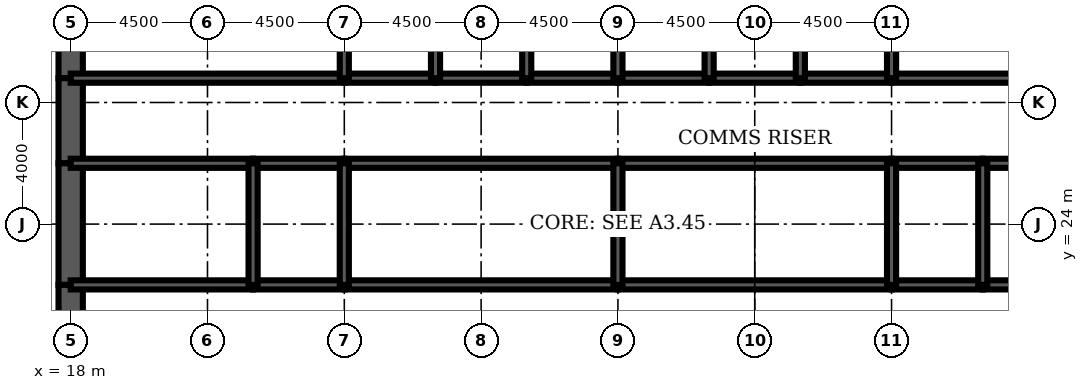
"""IFC4 building model, lengths in metres.
Left out: names, types, materials, properties, quantities, classifications, styles, units other than length and angle.
Written with IfcOpenShell. Run it as: python <this file> out.ifc"""

import sys

from ifc_helpers import new_model, si_unit, direction, frame, frame_2d, origin, place, context, subcontext, project, spatial, rectangle, extrude, element, fill, save


model = new_model("IFC4")
c1 = context("Model", 3, precision=1e-05, world=origin(), true_north=direction((0.0, 1.0)))
c2 = subcontext(c1, "Body", "Model", "MODEL_VIEW")
j1 = project(units=[si_unit("LENGTHUNIT", "METRE"), si_unit("PLANEANGLEUNIT", "RADIAN")], contexts=[c1])
p1 = place(None, origin())
s1 = spatial("IfcSite", under=j1, at=p1, CompositionType="ELEMENT")
p2 = place(p1, origin())
s2 = spatial("IfcBuilding", under=s1, at=p2, CompositionType="ELEMENT")
p3 = place(p2, frame((0.0, 0.0, 194.2)))
s3 = spatial("IfcBuildingStorey", under=s2, at=p3, CompositionType="ELEMENT", Elevation=194.2)
p4 = place(p3, frame((18.0, 32.0, 0.0), z_axis=(0.0, 0.0, 1.0), x_axis=(0.0, -1.0, 0.0)))
e1 = element("IfcWall", 1, at=p4, inside=s3, PredefinedType="SHEAR", context=c2, shape_type="SweptSolid", body=[
    extrude(rectangle(XDim=3.2, YDim=0.8, at=frame_2d((1.6, 0.0))), origin(), (0.0, 0.0, 1.0), 4.2),
])
p5 = place(p3, frame((18.0, 28.8, 0.0), z_axis=(0.0, 0.0, 1.0), x_axis=(0.0, -1.0, 0.0)))
e2 = element("IfcWall", 2, at=p5, inside=s3, PredefinedType="SHEAR", context=c2, shape_type="SweptSolid", body=[
    extrude(rectangle(XDim=2.8, YDim=0.8, at=frame_2d((1.4, 0.0))), origin(), (0.0, 0.0, 1.0), 4.2),
])
p6 = place(p5, frame((0.4, 0.0, 0.0)))
e3 = element("IfcOpeningElement", 3, at=p6, cuts=e2, PredefinedType="OPENING", context=c2, shape_type="SweptSolid", body=[
    extrude(rectangle(XDim=1.8, YDim=2.1, at=frame_2d((0.9, 1.05))), frame((0.0, 0.41, 0.0), z_axis=(0.0, -1.0, 0.0), x_axis=(1.0, 0.0, 0.0)), (0.0, 0.0, 1.0), 0.82),
])
p7 = place(p3, frame((18.0, 26.0, 0.0), z_axis=(0.0, 0.0, 1.0), x_axis=(0.0, -1.0, 0.0)))
e4 = element("IfcWall", 4, at=p7, inside=s3, PredefinedType="SHEAR", context=c2, shape_type="SweptSolid", body=[
    extrude(rectangle(XDim=4.0, YDim=0.8, at=frame_2d((2.0, 0.0))), origin(), (0.0, 0.0, 1.0), 4.2),
])
p8 = place(p3, frame((18.0, 22.0, 0.0), z_axis=(0.0, 0.0, 1.0), x_axis=(0.0, -1.0, 0.0)))
e5 = element("IfcWall", 5, at=p8, inside=s3, PredefinedType="SHEAR", context=c2, shape_type="SweptSolid", body=[
    extrude(rectangle(XDim=2.8, YDim=0.8, at=frame_2d((1.4, 0.0))), origin(), (0.0, 0.0, 1.0), 4.2),
])
p9 = place(p8, frame((0.6, 0.0, 0.0)))
e6 = element("IfcOpeningElement", 6, at=p9, cuts=e5, PredefinedType="OPENING", context=c2, shape_type="SweptSolid", body=[
    extrude(rectangle(XDim=1.8, YDim=2.1, at=frame_2d((0.9, 1.05))), frame((0.0, 0.41, 0.0), z_axis=(0.0, -1.0, 0.0), x_axis=(1.0, 0.0, 0.0)), (0.0, 0.0, 1.0), 0.82),
])
p10 = place(p3, frame((18.0, 28.8, 0.0), z_axis=(0.0, 0.0, 1.0), x_axis=(1.0, 0.0, 0.0)))
e7 = element("IfcWall", 7, at=p10, inside=s3, PredefinedType="SOLIDWALL", context=c2, shape_type="SweptSolid", body=[
    extrude(rectangle(XDim=9.0, YDim=0.3, at=frame_2d((4.5, 0.0))), origin(), (0.0, 0.0, 1.0), 4.2),
])
p11 = place(p10, frame((0.65, 0.0, 0.0)))
e8 = element("IfcOpeningElement", 8, at=p11, cuts=e7, PredefinedType="OPENING", context=c2, shape_type="SweptSolid", body=[
    extrude(rectangle(XDim=1.0, YDim=2.1, at=frame_2d((0.5, 1.05))), frame((0.0, 0.16, 0.0), z_axis=(0.0, -1.0, 0.0), x_axis=(1.0, 0.0, 0.0)), (0.0, 0.0, 1.0), 0.32),
])
p12 = place(p3, frame((27.0, 28.8, 0.0), z_axis=(0.0, 0.0, 1.0), x_axis=(1.0, 0.0, 0.0)))
e9 = element("IfcWall", 9, at=p12, inside=s3, PredefinedType="SOLIDWALL", context=c2, shape_type="SweptSolid", body=[
    extrude(rectangle(XDim=3.0, YDim=0.3, at=frame_2d((1.5, 0.0))), origin(), (0.0, 0.0, 1.0), 4.2),
])
p13 = place(p12, frame((0.95, 0.0, 0.0)))
e10 = element("IfcOpeningElement", 10, at=p13, cuts=e9, PredefinedType="OPENING", context=c2, shape_type="SweptSolid", body=[
    extrude(rectangle(XDim=1.1, YDim=2.2, at=frame_2d((0.55, 1.1))), frame((0.0, 0.16, 0.0), z_axis=(0.0, -1.0, 0.0), x_axis=(1.0, 0.0, 0.0)), (0.0, 0.0, 1.0), 0.32),
])
p14 = place(p3, frame((30.0, 28.8, 0.0), z_axis=(0.0, 0.0, 1.0), x_axis=(1.0, 0.0, 0.0)))
e11 = element("IfcWall", 11, at=p14, inside=s3, PredefinedType="SOLIDWALL", context=c2, shape_type="SweptSolid", body=[
    extrude(rectangle(XDim=3.0, YDim=0.3, at=frame_2d((1.5, 0.0))), origin(), (0.0, 0.0, 1.0), 4.2),
])
p15 = place(p14, frame((0.95, 0.0, 0.0)))
e12 = element("IfcOpeningElement", 12, at=p15, cuts=e11, PredefinedType="OPENING", context=c2, shape_type="SweptSolid", body=[
    extrude(rectangle(XDim=1.1, YDim=2.2, at=frame_2d((0.55, 1.1))), frame((0.0, 0.16, 0.0), z_axis=(0.0, -1.0, 0.0), x_axis=(1.0, 0.0, 0.0)), (0.0, 0.0, 1.0), 0.32),
])
p16 = place(p3, frame((33.0, 28.8, 0.0), z_axis=(0.0, 0.0, 1.0), x_axis=(1.0, 0.0, 0.0)))
e13 = element("IfcWall", 13, at=p16, inside=s3, PredefinedType="SOLIDWALL", context=c2, shape_type="SweptSolid", body=[
    extrude(rectangle(XDim=3.0, YDim=0.3, at=frame_2d((1.5, 0.0))), origin(), (0.0, 0.0, 1.0), 4.2),
])
p17 = place(p16, frame((0.95, 0.0, 0.0)))
e14 = element("IfcOpeningElement", 14, at=p17, cuts=e13, PredefinedType="OPENING", context=c2, shape_type="SweptSolid", body=[
    extrude(rectangle(XDim=1.1, YDim=2.2, at=frame_2d((0.55, 1.1))), frame((0.0, 0.16, 0.0), z_axis=(0.0, -1.0, 0.0), x_axis=(1.0, 0.0, 0.0)), (0.0, 0.0, 1.0), 0.32),
])
for number, where, z_axis, x_axis in (
    (15, (36.0, 28.8, 0.0), (0.0, 0.0, 1.0), (1.0, 0.0, 0.0)),
    (16, (39.0, 28.8, 0.0), (0.0, 0.0, 1.0), (1.0, 0.0, 0.0)),
):
    element("IfcWall", number, at=place(p3, frame(where, z_axis=z_axis, x_axis=x_axis)), inside=s3, PredefinedType="SOLIDWALL", context=c2, shape_type="SweptSolid", body=[
        extrude(rectangle(XDim=3.0, YDim=0.3, at=frame_2d((1.5, 0.0))), origin(), (0.0, 0.0, 1.0), 4.2),
    ])
p18 = place(p3, frame((42.0, 28.8, 0.0), z_axis=(0.0, 0.0, 1.0), x_axis=(1.0, 0.0, 0.0)))
e17 = element("IfcWall", 17, at=p18, inside=s3, PredefinedType="SOLIDWALL", context=c2, shape_type="SweptSolid", body=[
    extrude(rectangle(XDim=3.0, YDim=0.3, at=frame_2d((1.5, 0.0))), origin(), (0.0, 0.0, 1.0), 4.2),
])
p19 = place(p18, frame((0.95, 0.0, 0.0)))
e18 = element("IfcOpeningElement", 18, at=p19, cuts=e17, PredefinedType="OPENING", context=c2, shape_type="SweptSolid", body=[
    extrude(rectangle(XDim=1.1, YDim=2.2, at=frame_2d((0.55, 1.1))), frame((0.0, 0.16, 0.0), z_axis=(0.0, -1.0, 0.0), x_axis=(1.0, 0.0, 0.0)), (0.0, 0.0, 1.0), 0.32),
])
p20 = place(p3, frame((45.0, 28.8, 0.0), z_axis=(0.0, 0.0, 1.0), x_axis=(1.0, 0.0, 0.0)))
e19 = element("IfcWall", 19, at=p20, inside=s3, PredefinedType="SOLIDWALL", context=c2, shape_type="SweptSolid", body=[
    extrude(rectangle(XDim=9.0, YDim=0.3, at=frame_2d((4.5, 0.0))), origin(), (0.0, 0.0, 1.0), 4.2),
])
p21 = place(p20, frame((7.35, 0.0, 0.0)))
e20 = element("IfcOpeningElement", 20, at=p21, cuts=e19, PredefinedType="OPENING", context=c2, shape_type="SweptSolid", body=[
    extrude(rectangle(XDim=1.0, YDim=2.1, at=frame_2d((0.5, 1.05))), frame((0.0, 0.16, 0.0), z_axis=(0.0, -1.0, 0.0), x_axis=(1.0, 0.0, 0.0)), (0.0, 0.0, 1.0), 0.32),
])
p22 = place(p3, frame((18.0, 22.0, 0.0), z_axis=(0.0, 0.0, 1.0), x_axis=(1.0, 0.0, 0.0)))
e21 = element("IfcWall", 21, at=p22, inside=s3, PredefinedType="SOLIDWALL", context=c2, shape_type="SweptSolid", body=[
    extrude(rectangle(XDim=6.0, YDim=0.3, at=frame_2d((3.0, 0.0))), origin(), (0.0, 0.0, 1.0), 4.2),
])
p23 = place(p22, frame((4.4, 0.0, 0.0)))
e22 = element("IfcOpeningElement", 22, at=p23, cuts=e21, PredefinedType="OPENING", context=c2, shape_type="SweptSolid", body=[
    extrude(rectangle(XDim=1.0, YDim=2.1, at=frame_2d((0.5, 1.05))), frame((0.0, 0.16, 0.0), z_axis=(0.0, -1.0, 0.0), x_axis=(1.0, 0.0, 0.0)), (0.0, 0.0, 1.0), 0.32),
])
p24 = place(p22, frame((0.95, 0.0, 0.0)))
e23 = element("IfcOpeningElement", 23, at=p24, cuts=e21, PredefinedType="OPENING", context=c2, shape_type="SweptSolid", body=[
    extrude(rectangle(XDim=1.0, YDim=2.1, at=frame_2d((0.5, 1.05))), frame((0.0, 0.16, 0.0), z_axis=(0.0, -1.0, 0.0), x_axis=(1.0, 0.0, 0.0)), (0.0, 0.0, 1.0), 0.32),
])
p25 = place(p3, frame((24.0, 22.0, 0.0), z_axis=(0.0, 0.0, 1.0), x_axis=(1.0, 0.0, 0.0)))
e24 = element("IfcWall", 24, at=p25, inside=s3, PredefinedType="SOLIDWALL", context=c2, shape_type="SweptSolid", body=[
    extrude(rectangle(XDim=3.0, YDim=0.3, at=frame_2d((1.5, 0.0))), origin(), (0.0, 0.0, 1.0), 4.2),
])
p26 = place(p25, frame((1.0, 0.0, 0.0)))
e25 = element("IfcOpeningElement", 25, at=p26, cuts=e24, PredefinedType="OPENING", context=c2, shape_type="SweptSolid", body=[
    extrude(rectangle(XDim=1.0, YDim=2.1, at=frame_2d((0.5, 1.05))), frame((0.0, 0.16, 0.0), z_axis=(0.0, -1.0, 0.0), x_axis=(1.0, 0.0, 0.0)), (0.0, 0.0, 1.0), 0.32),
])
p27 = place(p3, frame((27.0, 22.0, 0.0), z_axis=(0.0, 0.0, 1.0), x_axis=(1.0, 0.0, 0.0)))
e26 = element("IfcWall", 26, at=p27, inside=s3, PredefinedType="SOLIDWALL", context=c2, shape_type="SweptSolid", body=[
    extrude(rectangle(XDim=9.0, YDim=0.3, at=frame_2d((4.5, 0.0))), origin(), (0.0, 0.0, 1.0), 4.2),
])
p28 = place(p27, frame((4.0, 0.0, 0.0)))
e27 = element("IfcOpeningElement", 27, at=p28, cuts=e26, PredefinedType="OPENING", context=c2, shape_type="SweptSolid", body=[
    extrude(rectangle(XDim=1.0, YDim=2.1, at=frame_2d((0.5, 1.05))), frame((0.0, 0.16, 0.0), z_axis=(0.0, -1.0, 0.0), x_axis=(1.0, 0.0, 0.0)), (0.0, 0.0, 1.0), 0.32),
])
p29 = place(p3, frame((36.0, 22.0, 0.0), z_axis=(0.0, 0.0, 1.0), x_axis=(1.0, 0.0, 0.0)))
e28 = element("IfcWall", 28, at=p29, inside=s3, PredefinedType="SOLIDWALL", context=c2, shape_type="SweptSolid", body=[
    extrude(rectangle(XDim=9.0, YDim=0.3, at=frame_2d((4.5, 0.0))), origin(), (0.0, 0.0, 1.0), 4.2),
])
p30 = place(p29, frame((4.0, 0.0, 0.0)))
e29 = element("IfcOpeningElement", 29, at=p30, cuts=e28, PredefinedType="OPENING", context=c2, shape_type="SweptSolid", body=[
    extrude(rectangle(XDim=1.0, YDim=2.1, at=frame_2d((0.5, 1.05))), frame((0.0, 0.16, 0.0), z_axis=(0.0, -1.0, 0.0), x_axis=(1.0, 0.0, 0.0)), (0.0, 0.0, 1.0), 0.32),
])
p31 = place(p3, frame((45.0, 22.0, 0.0), z_axis=(0.0, 0.0, 1.0), x_axis=(1.0, 0.0, 0.0)))
e30 = element("IfcWall", 30, at=p31, inside=s3, PredefinedType="SOLIDWALL", context=c2, shape_type="SweptSolid", body=[
    extrude(rectangle(XDim=3.0, YDim=0.3, at=frame_2d((1.5, 0.0))), origin(), (0.0, 0.0, 1.0), 4.2),
])
p32 = place(p31, frame((1.0, 0.0, 0.0)))
e31 = element("IfcOpeningElement", 31, at=p32, cuts=e30, PredefinedType="OPENING", context=c2, shape_type="SweptSolid", body=[
    extrude(rectangle(XDim=1.0, YDim=2.1, at=frame_2d((0.5, 1.05))), frame((0.0, 0.16, 0.0), z_axis=(0.0, -1.0, 0.0), x_axis=(1.0, 0.0, 0.0)), (0.0, 0.0, 1.0), 0.32),
])
p33 = place(p3, frame((48.0, 22.0, 0.0), z_axis=(0.0, 0.0, 1.0), x_axis=(1.0, 0.0, 0.0)))
e32 = element("IfcWall", 32, at=p33, inside=s3, PredefinedType="SOLIDWALL", context=c2, shape_type="SweptSolid", body=[
    extrude(rectangle(XDim=6.0, YDim=0.3, at=frame_2d((3.0, 0.0))), origin(), (0.0, 0.0, 1.0), 4.2),
])
p34 = place(p33, frame((2.0, 0.0, 0.0)))
e33 = element("IfcOpeningElement", 33, at=p34, cuts=e32, PredefinedType="OPENING", context=c2, shape_type="SweptSolid", body=[
    extrude(rectangle(XDim=1.0, YDim=2.1, at=frame_2d((0.5, 1.05))), frame((0.0, 0.16, 0.0), z_axis=(0.0, -1.0, 0.0), x_axis=(1.0, 0.0, 0.0)), (0.0, 0.0, 1.0), 0.32),
])
p35 = place(p33, frame((4.05, 0.0, 0.0)))
e34 = element("IfcOpeningElement", 34, at=p35, cuts=e32, PredefinedType="OPENING", context=c2, shape_type="SweptSolid", body=[
    extrude(rectangle(XDim=1.0, YDim=2.1, at=frame_2d((0.5, 1.05))), frame((0.0, 0.16, 0.0), z_axis=(0.0, -1.0, 0.0), x_axis=(1.0, 0.0, 0.0)), (0.0, 0.0, 1.0), 0.32),
])
p36 = place(p3, frame((18.0, 26.0, 0.0), z_axis=(0.0, 0.0, 1.0), x_axis=(1.0, 0.0, 0.0)))
e35 = element("IfcWall", 35, at=p36, inside=s3, PredefinedType="SOLIDWALL", context=c2, shape_type="SweptSolid", body=[
    extrude(rectangle(XDim=6.0, YDim=0.3, at=frame_2d((3.0, 0.0))), origin(), (0.0, 0.0, 1.0), 4.2),
])
p37 = place(p3, frame((24.0, 26.0, 0.0), z_axis=(0.0, 0.0, 1.0), x_axis=(1.0, 0.0, 0.0)))
e36 = element("IfcWall", 36, at=p37, inside=s3, PredefinedType="SOLIDWALL", context=c2, shape_type="SweptSolid", body=[
    extrude(rectangle(XDim=3.0, YDim=0.3, at=frame_2d((1.5, 0.0))), origin(), (0.0, 0.0, 1.0), 4.2),
])
for number, where, z_axis, x_axis in (
    (37, (27.0, 26.0, 0.0), (0.0, 0.0, 1.0), (1.0, 0.0, 0.0)),
    (38, (36.0, 26.0, 0.0), (0.0, 0.0, 1.0), (1.0, 0.0, 0.0)),
):
    element("IfcWall", number, at=place(p3, frame(where, z_axis=z_axis, x_axis=x_axis)), inside=s3, PredefinedType="SOLIDWALL", context=c2, shape_type="SweptSolid", body=[
        extrude(rectangle(XDim=9.0, YDim=0.3, at=frame_2d((4.5, 0.0))), origin(), (0.0, 0.0, 1.0), 4.2),
    ])
p38 = place(p3, frame((45.0, 26.0, 0.0), z_axis=(0.0, 0.0, 1.0), x_axis=(1.0, 0.0, 0.0)))
e39 = element("IfcWall", 39, at=p38, inside=s3, PredefinedType="SOLIDWALL", context=c2, shape_type="SweptSolid", body=[
    extrude(rectangle(XDim=3.0, YDim=0.3, at=frame_2d((1.5, 0.0))), origin(), (0.0, 0.0, 1.0), 4.2),
])
p39 = place(p3, frame((48.0, 26.0, 0.0), z_axis=(0.0, 0.0, 1.0), x_axis=(1.0, 0.0, 0.0)))
e40 = element("IfcWall", 40, at=p39, inside=s3, PredefinedType="SOLIDWALL", context=c2, shape_type="SweptSolid", body=[
    extrude(rectangle(XDim=6.0, YDim=0.3, at=frame_2d((3.0, 0.0))), origin(), (0.0, 0.0, 1.0), 4.2),
])
for number, where, z_axis, x_axis in (
    (41, (27.0, 28.8, 0.0), (0.0, 0.0, 1.0), (0.0, 1.0, 0.0)),
    (42, (30.0, 28.8, 0.0), (0.0, 0.0, 1.0), (0.0, 1.0, 0.0)),
    (43, (33.0, 28.8, 0.0), (0.0, 0.0, 1.0), (0.0, 1.0, 0.0)),
    (44, (36.0, 28.8, 0.0), (0.0, 0.0, 1.0), (0.0, 1.0, 0.0)),
    (45, (39.0, 28.8, 0.0), (0.0, 0.0, 1.0), (0.0, 1.0, 0.0)),
    (46, (42.0, 28.8, 0.0), (0.0, 0.0, 1.0), (0.0, 1.0, 0.0)),
    (47, (45.0, 28.8, 0.0), (0.0, 0.0, 1.0), (0.0, 1.0, 0.0)),
):
    element("IfcWall", number, at=place(p3, frame(where, z_axis=z_axis, x_axis=x_axis)), inside=s3, PredefinedType="SOLIDWALL", context=c2, shape_type="SweptSolid", body=[
        extrude(rectangle(XDim=3.2, YDim=0.3, at=frame_2d((1.6, 0.0))), origin(), (0.0, 0.0, 1.0), 4.2),
    ])
for number, where, z_axis, x_axis in (
    (48, (24.0, 22.0, 0.0), (0.0, 0.0, 1.0), (0.0, 1.0, 0.0)),
    (49, (27.0, 22.0, 0.0), (0.0, 0.0, 1.0), (0.0, 1.0, 0.0)),
    (50, (36.0, 22.0, 0.0), (0.0, 0.0, 1.0), (0.0, 1.0, 0.0)),
    (51, (45.0, 22.0, 0.0), (0.0, 0.0, 1.0), (0.0, 1.0, 0.0)),
    (52, (48.0, 22.0, 0.0), (0.0, 0.0, 1.0), (0.0, 1.0, 0.0)),
):
    element("IfcWall", number, at=place(p3, frame(where, z_axis=z_axis, x_axis=x_axis)), inside=s3, PredefinedType="SOLIDWALL", context=c2, shape_type="SweptSolid", body=[
        extrude(rectangle(XDim=4.0, YDim=0.3, at=frame_2d((2.0, 0.0))), origin(), (0.0, 0.0, 1.0), 4.2),
    ])
p40 = place(p3, frame((38.5, 22.15, 0.0), z_axis=(0.0, 0.0, 1.0), x_axis=(0.0, 1.0, 0.0)))
e53 = element("IfcWall", 53, at=p40, inside=s3, PredefinedType="PARTITIONING", context=c2, shape_type="SweptSolid", body=[
    extrude(rectangle(XDim=3.7, YDim=0.15, at=frame_2d((1.85, 0.0))), origin(), (0.0, 0.0, 1.0), 3.0),
])
p41 = place(p40, frame((2.2, 0.0, 0.0)))
e54 = element("IfcOpeningElement", 54, at=p41, cuts=e53, PredefinedType="OPENING", context=c2, shape_type="SweptSolid", body=[
    extrude(rectangle(XDim=1.0, YDim=2.1, at=frame_2d((0.5, 1.05))), frame((0.0, 0.085, 0.0), z_axis=(0.0, -1.0, 0.0), x_axis=(1.0, 0.0, 0.0)), (0.0, 0.0, 1.0), 0.17),
])
p42 = place(p3, frame((20.575, 22.15, 0.0), z_axis=(0.0, 0.0, 1.0), x_axis=(0.0, 1.0, 0.0)))
e55 = element("IfcWall", 55, at=p42, inside=s3, PredefinedType="PARTITIONING", context=c2, shape_type="SweptSolid", body=[
    extrude(rectangle(XDim=3.7, YDim=0.15, at=frame_2d((1.85, 0.0))), origin(), (0.0, 0.0, 1.0), 3.0),
])
p43 = place(p3, frame((25.2, 26.15, 0.0), z_axis=(0.0, 0.0, 1.0), x_axis=(0.0, 1.0, 0.0)))
e56 = element("IfcWall", 56, at=p43, inside=s3, PredefinedType="PARTITIONING", context=c2, shape_type="SweptSolid", body=[
    extrude(rectangle(XDim=2.5, YDim=0.15, at=frame_2d((1.25, 0.0))), origin(), (0.0, 0.0, 1.0), 3.0),
])
p44 = place(p43, frame((0.35, 0.0, 0.0)))
e57 = element("IfcOpeningElement", 57, at=p44, cuts=e56, PredefinedType="OPENING", context=c2, shape_type="SweptSolid", body=[
    extrude(rectangle(XDim=1.0, YDim=2.1, at=frame_2d((0.5, 1.05))), frame((0.0, 0.085, 0.0), z_axis=(0.0, -1.0, 0.0), x_axis=(1.0, 0.0, 0.0)), (0.0, 0.0, 1.0), 0.17),
])
p45 = place(p41, origin())
e58 = element("IfcDoor", 58, at=p45, inside=s3, OperationType="SINGLE_SWING_RIGHT", PredefinedType="DOOR", context=c2, shape_type="SweptSolid", body=[
    extrude(rectangle(XDim=1.0, YDim=2.1, at=frame_2d((0.5, 1.05))), frame((0.0, 0.025, 0.0), z_axis=(0.0, -1.0, 0.0), x_axis=(1.0, 0.0, 0.0)), (0.0, 0.0, 1.0), 0.05),
])
fill(e54, e58)
p46 = place(p44, origin())
e59 = element("IfcDoor", 59, at=p46, inside=s3, OperationType="SINGLE_SWING_LEFT", PredefinedType="DOOR", context=c2, shape_type="SweptSolid", body=[
    extrude(rectangle(XDim=1.0, YDim=2.1, at=frame_2d((0.5, 1.05))), frame((0.0, 0.025, 0.0), z_axis=(0.0, -1.0, 0.0), x_axis=(1.0, 0.0, 0.0)), (0.0, 0.0, 1.0), 0.05),
])
fill(e57, e59)
p47 = place(p19, origin())
e60 = element("IfcDoor", 60, at=p47, inside=s3, OperationType="DOUBLE_DOOR_SLIDING", PredefinedType="USERDEFINED", context=c2, shape_type="SweptSolid", body=[
    extrude(rectangle(XDim=1.1, YDim=2.2, at=frame_2d((0.55, 1.1))), frame((0.0, 0.025, 0.0), z_axis=(0.0, -1.0, 0.0), x_axis=(1.0, 0.0, 0.0)), (0.0, 0.0, 1.0), 0.05),
])
fill(e18, e60)
p48 = place(p13, origin())
e61 = element("IfcDoor", 61, at=p48, inside=s3, OperationType="DOUBLE_DOOR_SLIDING", PredefinedType="USERDEFINED", context=c2, shape_type="SweptSolid", body=[
    extrude(rectangle(XDim=1.1, YDim=2.2, at=frame_2d((0.55, 1.1))), frame((0.0, 0.025, 0.0), z_axis=(0.0, -1.0, 0.0), x_axis=(1.0, 0.0, 0.0)), (0.0, 0.0, 1.0), 0.05),
])
fill(e10, e61)
p49 = place(p15, origin())
e62 = element("IfcDoor", 62, at=p49, inside=s3, OperationType="DOUBLE_DOOR_SLIDING", PredefinedType="USERDEFINED", context=c2, shape_type="SweptSolid", body=[
    extrude(rectangle(XDim=1.1, YDim=2.2, at=frame_2d((0.55, 1.1))), frame((0.0, 0.025, 0.0), z_axis=(0.0, -1.0, 0.0), x_axis=(1.0, 0.0, 0.0)), (0.0, 0.0, 1.0), 0.05),
])
fill(e12, e62)
p50 = place(p17, origin())
e63 = element("IfcDoor", 63, at=p50, inside=s3, OperationType="DOUBLE_DOOR_SLIDING", PredefinedType="USERDEFINED", context=c2, shape_type="SweptSolid", body=[
    extrude(rectangle(XDim=1.1, YDim=2.2, at=frame_2d((0.55, 1.1))), frame((0.0, 0.025, 0.0), z_axis=(0.0, -1.0, 0.0), x_axis=(1.0, 0.0, 0.0)), (0.0, 0.0, 1.0), 0.05),
])
fill(e14, e63)
p51 = place(p11, origin())
e64 = element("IfcDoor", 64, at=p51, inside=s3, OperationType="SINGLE_SWING_LEFT", PredefinedType="DOOR", context=c2, shape_type="SweptSolid", body=[
    extrude(rectangle(XDim=1.0, YDim=2.1, at=frame_2d((0.5, 1.05))), frame((0.0, 0.025, 0.0), z_axis=(0.0, -1.0, 0.0), x_axis=(1.0, 0.0, 0.0)), (0.0, 0.0, 1.0), 0.05),
])
fill(e8, e64)
p52 = place(p9, origin())
e65 = element("IfcDoor", 65, at=p52, inside=s3, OperationType="SINGLE_SWING_LEFT", PredefinedType="DOOR", context=c2, shape_type="SweptSolid", body=[
    extrude(rectangle(XDim=1.8, YDim=2.1, at=frame_2d((0.9, 1.05))), frame((0.0, 0.4, 0.0), z_axis=(0.0, -1.0, 0.0), x_axis=(1.0, 0.0, 0.0)), (0.0, 0.0, 1.0), 0.8),
])
fill(e6, e65)
p53 = place(p6, origin())
e66 = element("IfcDoor", 66, at=p53, inside=s3, OperationType="SINGLE_SWING_LEFT", PredefinedType="DOOR", context=c2, shape_type="SweptSolid", body=[
    extrude(rectangle(XDim=1.8, YDim=2.1, at=frame_2d((0.9, 1.05))), frame((0.0, 0.4, 0.0), z_axis=(0.0, -1.0, 0.0), x_axis=(1.0, 0.0, 0.0)), (0.0, 0.0, 1.0), 0.8),
])
fill(e3, e66)
p54 = place(p23, origin())
e67 = element("IfcDoor", 67, at=p54, inside=s3, OperationType="SINGLE_SWING_RIGHT", PredefinedType="DOOR", context=c2, shape_type="SweptSolid", body=[
    extrude(rectangle(XDim=1.0, YDim=2.1, at=frame_2d((0.5, 1.05))), frame((0.0, 0.025, 0.0), z_axis=(0.0, -1.0, 0.0), x_axis=(1.0, 0.0, 0.0)), (0.0, 0.0, 1.0), 0.05),
])
fill(e22, e67)
p55 = place(p26, origin())
e68 = element("IfcDoor", 68, at=p55, inside=s3, OperationType="SINGLE_SWING_LEFT", PredefinedType="DOOR", context=c2, shape_type="SweptSolid", body=[
    extrude(rectangle(XDim=1.0, YDim=2.1, at=frame_2d((0.5, 1.05))), frame((0.0, 0.025, 0.0), z_axis=(0.0, -1.0, 0.0), x_axis=(1.0, 0.0, 0.0)), (0.0, 0.0, 1.0), 0.05),
])
fill(e25, e68)
p56 = place(p28, origin())
e69 = element("IfcDoor", 69, at=p56, inside=s3, OperationType="SINGLE_SWING_LEFT", PredefinedType="DOOR", context=c2, shape_type="SweptSolid", body=[
    extrude(rectangle(XDim=1.0, YDim=2.1, at=frame_2d((0.5, 1.05))), frame((0.0, 0.025, 0.0), z_axis=(0.0, -1.0, 0.0), x_axis=(1.0, 0.0, 0.0)), (0.0, 0.0, 1.0), 0.05),
])
fill(e27, e69)
p57 = place(p30, origin())
e70 = element("IfcDoor", 70, at=p57, inside=s3, OperationType="SINGLE_SWING_LEFT", PredefinedType="DOOR", context=c2, shape_type="SweptSolid", body=[
    extrude(rectangle(XDim=1.0, YDim=2.1, at=frame_2d((0.5, 1.05))), frame((0.0, 0.025, 0.0), z_axis=(0.0, -1.0, 0.0), x_axis=(1.0, 0.0, 0.0)), (0.0, 0.0, 1.0), 0.05),
])
fill(e29, e70)
p58 = place(p32, origin())
e71 = element("IfcDoor", 71, at=p58, inside=s3, OperationType="SINGLE_SWING_LEFT", PredefinedType="DOOR", context=c2, shape_type="SweptSolid", body=[
    extrude(rectangle(XDim=1.0, YDim=2.1, at=frame_2d((0.5, 1.05))), frame((0.0, 0.025, 0.0), z_axis=(0.0, -1.0, 0.0), x_axis=(1.0, 0.0, 0.0)), (0.0, 0.0, 1.0), 0.05),
])
fill(e31, e71)
p59 = place(p24, origin())
e72 = element("IfcDoor", 72, at=p59, inside=s3, OperationType="SINGLE_SWING_LEFT", PredefinedType="DOOR", context=c2, shape_type="SweptSolid", body=[
    extrude(rectangle(XDim=1.0, YDim=2.1, at=frame_2d((0.5, 1.05))), frame((0.0, 0.025, 0.0), z_axis=(0.0, -1.0, 0.0), x_axis=(1.0, 0.0, 0.0)), (0.0, 0.0, 1.0), 0.05),
])
fill(e23, e72)
save(model, sys.argv[1])
